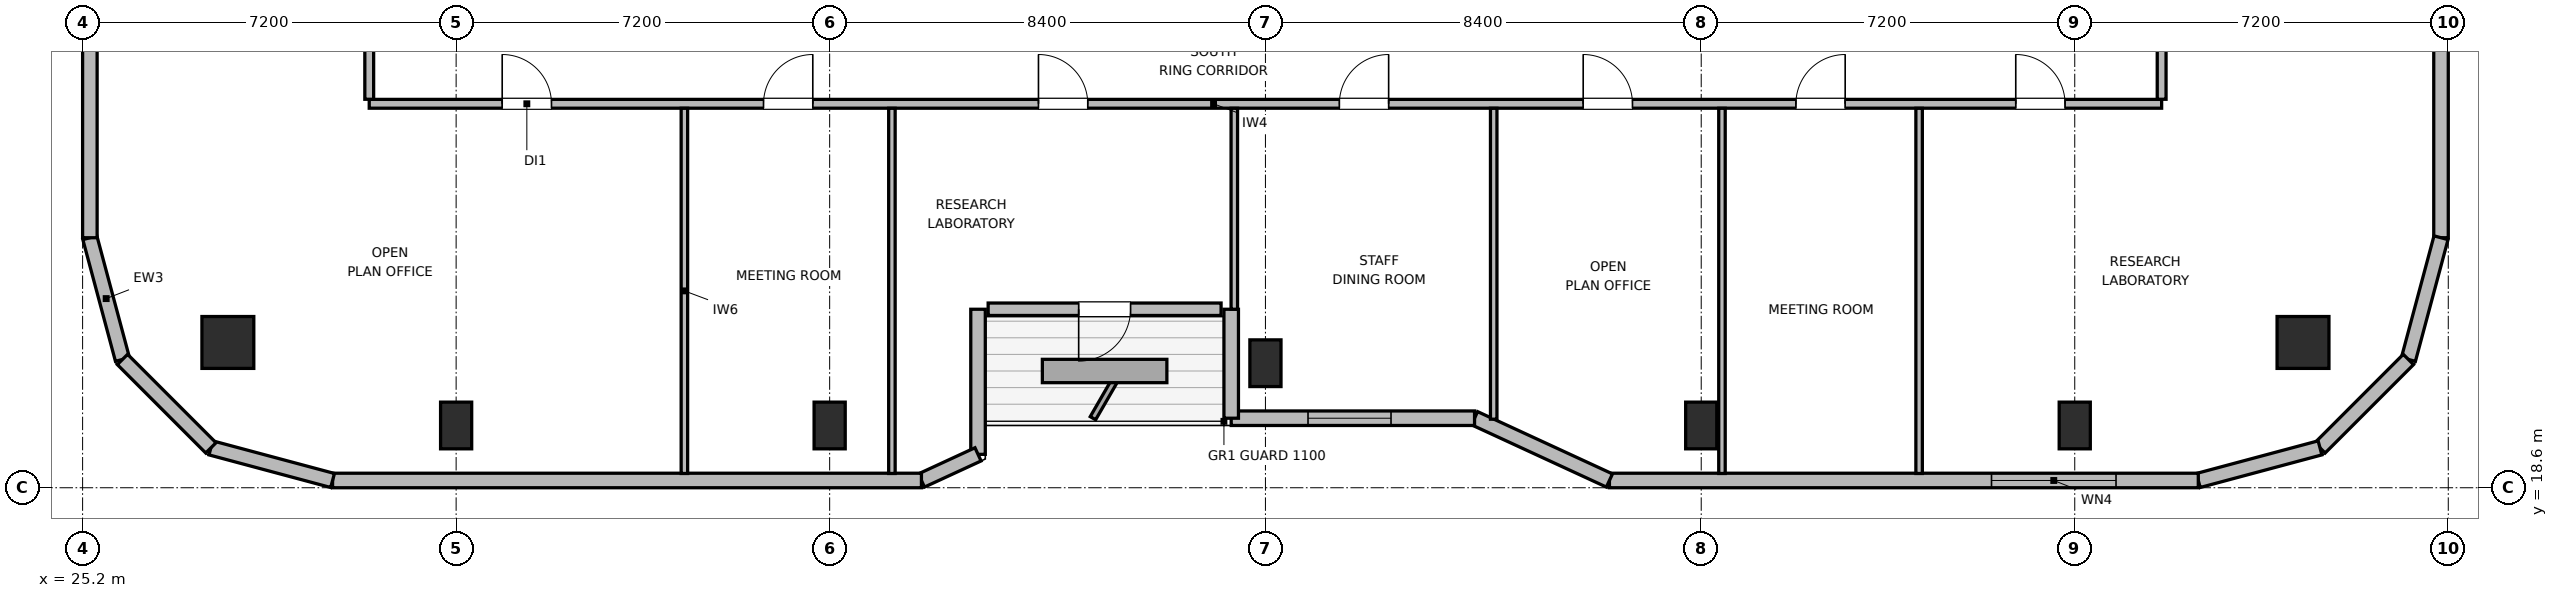
"""IFC4 building model, lengths in metres.
Left out: names, types, materials, properties, quantities, classifications, styles, units other than length and angle.
Written with IfcOpenShell. Run it as: python <this file> out.ifc"""

import sys

from ifc_helpers import new_model, si_unit, direction, frame, frame_2d, origin, origin_2d, place, context, subcontext, project, spatial, rectangle, circle, extrude, element, fill, save


model = new_model("IFC4")
c1 = context("Model", 3, precision=1e-05, world=origin(), true_north=direction((0.0, 1.0)))
c2 = subcontext(c1, "Body", "Model", "MODEL_VIEW")
j1 = project(units=[si_unit("LENGTHUNIT", "METRE"), si_unit("PLANEANGLEUNIT", "RADIAN")], contexts=[c1])
p1 = place(None, origin())
s1 = spatial("IfcSite", under=j1, at=p1, CompositionType="ELEMENT")
p2 = place(p1, origin())
s2 = spatial("IfcBuilding", under=s1, at=p2, CompositionType="ELEMENT")
p3 = place(p2, frame((0.0, 0.0, 314.1)))
s3 = spatial("IfcBuildingStorey", under=s2, at=p3, CompositionType="ELEMENT", Elevation=314.1)
for number, where, z_axis, x_axis in (
    (1, (28.0, 21.4, 0.0), (0.0, 0.0, 1.0), (1.0, 0.0, 0.0)),
    (2, (68.0, 21.4, 0.0), (0.0, 0.0, 1.0), (1.0, 0.0, 0.0)),
):
    element("IfcColumn", number, at=place(p3, frame(where, z_axis=z_axis, x_axis=x_axis)), inside=s3, PredefinedType="COLUMN", context=c2, shape_type="SweptSolid", body=[
        extrude(circle(Radius=0.5, at=origin_2d()), origin(), (0.0, 0.0, 1.0), 3.9),
    ])
for number, where, z_axis, x_axis in (
    (3, (32.4, 19.8, 0.0), (0.0, 0.0, 1.0), (1.0, 0.0, 0.0)),
    (4, (39.6, 19.8, 0.0), (0.0, 0.0, 1.0), (1.0, 0.0, 0.0)),
    (5, (48.0, 21.0, 0.0), (0.0, 0.0, 1.0), (1.0, 0.0, 0.0)),
    (6, (56.4, 19.8, 0.0), (0.0, 0.0, 1.0), (1.0, 0.0, 0.0)),
    (7, (63.6, 19.8, 0.0), (0.0, 0.0, 1.0), (1.0, 0.0, 0.0)),
):
    element("IfcColumn", number, at=place(p3, frame(where, z_axis=z_axis, x_axis=x_axis)), inside=s3, PredefinedType="COLUMN", context=c2, shape_type="SweptSolid", body=[
        extrude(rectangle(XDim=0.6, YDim=0.9, at=origin_2d()), origin(), (0.0, 0.0, 1.0), 3.9),
    ])
p4 = place(p3, frame((25.969, 21.073, 0.0), z_axis=(0.0, 0.0, 1.0), x_axis=(-0.258751159445, 0.965944013639, 0.0)))
e8 = element("IfcWall", 8, at=p4, inside=s3, PredefinedType="SOLIDWALL", context=c2, shape_type="SweptSolid", body=[
    extrude(rectangle(XDim=2.429, YDim=0.28, at=frame_2d((1.214, 0.0))), origin(), (0.0, 0.0, 1.0), 3.68),
])
p5 = place(p3, frame((25.34, 23.418, 0.0), z_axis=(0.0, 0.0, 1.0), x_axis=(0.0, 1.0, 0.0)))
e9 = element("IfcWall", 9, at=p5, inside=s3, PredefinedType="SOLIDWALL", context=c2, shape_type="SweptSolid", body=[
    extrude(rectangle(XDim=5.842, YDim=0.28, at=frame_2d((2.921, 0.0))), origin(), (0.0, 0.0, 1.0), 3.68),
])
p6 = place(p3, frame((70.66, 37.66, 0.0), z_axis=(0.0, 0.0, 1.0), x_axis=(0.0, -1.0, 0.0)))
e10 = element("IfcWall", 10, at=p6, inside=s3, PredefinedType="SOLIDWALL", context=c2, shape_type="SweptSolid", body=[
    extrude(rectangle(XDim=14.241, YDim=0.28, at=frame_2d((7.121, 0.0))), origin(), (0.0, 0.0, 1.0), 3.68),
])
p7 = place(p6, frame((7.556, 0.0, 0.85)))
e11 = element("IfcOpeningElement", 11, at=p7, cuts=e10, PredefinedType="OPENING", context=c2, shape_type="SweptSolid", body=[
    extrude(rectangle(XDim=1.6, YDim=1.0, at=frame_2d((0.8, 0.5))), frame((0.0, 0.15, 0.0), z_axis=(0.0, -1.0, 0.0), x_axis=(1.0, 0.0, 0.0)), (0.0, 0.0, 1.0), 0.3),
])
p8 = place(p3, frame((70.66, 23.418, 0.0), z_axis=(0.0, 0.0, 1.0), x_axis=(-0.258751159445, -0.965944013639, 0.0)))
e12 = element("IfcWall", 12, at=p8, inside=s3, PredefinedType="SOLIDWALL", context=c2, shape_type="SweptSolid", body=[
    extrude(rectangle(XDim=2.429, YDim=0.28, at=frame_2d((1.214, 0.0))), origin(), (0.0, 0.0, 1.0), 3.68),
])
p9 = place(p3, frame((70.031, 21.073, 0.0), z_axis=(0.0, 0.0, 1.0), x_axis=(-0.707106781187, -0.707106781187, 0.0)))
e13 = element("IfcWall", 13, at=p9, inside=s3, PredefinedType="SOLIDWALL", context=c2, shape_type="SweptSolid", body=[
    extrude(rectangle(XDim=2.41, YDim=0.28, at=frame_2d((1.205, 0.0))), origin(), (0.0, 0.0, 1.0), 3.68),
])
p10 = place(p3, frame((68.327, 19.368, 0.0), z_axis=(0.0, 0.0, 1.0), x_axis=(-0.965937282298, -0.25877628691, 0.0)))
e14 = element("IfcWall", 14, at=p10, inside=s3, PredefinedType="SOLIDWALL", context=c2, shape_type="SweptSolid", body=[
    extrude(rectangle(XDim=2.428, YDim=0.28, at=frame_2d((1.214, 0.0))), origin(), (0.0, 0.0, 1.0), 3.68),
])
p11 = place(p3, frame((65.982, 18.74, 0.0), z_axis=(0.0, 0.0, 1.0), x_axis=(-1.0, 0.0, 0.0)))
e15 = element("IfcWall", 15, at=p11, inside=s3, PredefinedType="SOLIDWALL", context=c2, shape_type="SweptSolid", body=[
    extrude(rectangle(XDim=11.351, YDim=0.28, at=frame_2d((5.676, 0.0))), origin(), (0.0, 0.0, 1.0), 3.68),
])
p12 = place(p11, frame((1.586, 0.0, 0.85)))
e16 = element("IfcOpeningElement", 16, at=p12, cuts=e15, PredefinedType="OPENING", context=c2, shape_type="SweptSolid", body=[
    extrude(rectangle(XDim=2.4, YDim=1.15, at=frame_2d((1.2, 0.575))), frame((0.0, 0.15, 0.0), z_axis=(0.0, -1.0, 0.0), x_axis=(1.0, 0.0, 0.0)), (0.0, 0.0, 1.0), 0.3),
])
p13 = place(p3, frame((54.631, 18.74, 0.0), z_axis=(0.0, 0.0, 1.0), x_axis=(-0.907956889006, 0.419063584324, 0.0)))
e17 = element("IfcWall", 17, at=p13, inside=s3, PredefinedType="SOLIDWALL", context=c2, shape_type="SweptSolid", body=[
    extrude(rectangle(XDim=2.864, YDim=0.28, at=frame_2d((1.432, 0.0))), origin(), (0.0, 0.0, 1.0), 2.265),
])
p14 = place(p3, frame((52.031, 19.94, 0.0), z_axis=(0.0, 0.0, 1.0), x_axis=(-1.0, 0.0, 0.0)))
e18 = element("IfcWall", 18, at=p14, inside=s3, PredefinedType="SOLIDWALL", context=c2, shape_type="SweptSolid", body=[
    extrude(rectangle(XDim=4.691, YDim=0.28, at=frame_2d((2.345, 0.0))), origin(), (0.0, 0.0, 1.0), 2.265),
])
p15 = place(p14, frame((1.61, 0.0, 0.85)))
e19 = element("IfcOpeningElement", 19, at=p15, cuts=e18, PredefinedType="OPENING", context=c2, shape_type="SweptSolid", body=[
    extrude(rectangle(XDim=1.6, YDim=1.0, at=frame_2d((0.8, 0.5))), frame((0.0, 0.15, 0.0), z_axis=(0.0, -1.0, 0.0), x_axis=(1.0, 0.0, 0.0)), (0.0, 0.0, 1.0), 0.3),
])
p16 = place(p3, frame((47.34, 19.94, 0.0), z_axis=(0.0, 0.0, 1.0), x_axis=(0.0, 1.0, 0.0)))
e20 = element("IfcWall", 20, at=p16, inside=s3, PredefinedType="SOLIDWALL", context=c2, shape_type="SweptSolid", body=[
    extrude(rectangle(XDim=2.1, YDim=0.28, at=frame_2d((1.05, 0.0))), origin(), (0.0, 0.0, 1.0), 2.265),
])
p17 = place(p3, frame((47.145, 22.04, 0.0), z_axis=(0.0, 0.0, 1.0), x_axis=(-1.0, 0.0, 0.0)))
e21 = element("IfcWall", 21, at=p17, inside=s3, PredefinedType="SOLIDWALL", context=c2, shape_type="SweptSolid", body=[
    extrude(rectangle(XDim=4.49, YDim=0.24, at=frame_2d((2.245, 0.0))), origin(), (0.0, 0.0, 1.0), 3.68),
])
p18 = place(p17, frame((1.745, 0.0, 0.0)))
e22 = element("IfcOpeningElement", 22, at=p18, cuts=e21, PredefinedType="OPENING", context=c2, shape_type="SweptSolid", body=[
    extrude(rectangle(XDim=1.0, YDim=2.02, at=frame_2d((0.5, 1.01))), frame((0.0, 0.13, 0.0), z_axis=(0.0, -1.0, 0.0), x_axis=(1.0, 0.0, 0.0)), (0.0, 0.0, 1.0), 0.26),
])
p19 = place(p3, frame((42.46, 22.04, 0.0), z_axis=(0.0, 0.0, 1.0), x_axis=(0.0, -1.0, 0.0)))
e23 = element("IfcWall", 23, at=p19, inside=s3, PredefinedType="SOLIDWALL", context=c2, shape_type="SweptSolid", body=[
    extrude(rectangle(XDim=2.796, YDim=0.28, at=frame_2d((1.398, 0.0))), origin(), (0.0, 0.0, 1.0), 2.265),
])
p20 = place(p3, frame((42.46, 19.244, 0.0), z_axis=(0.0, 0.0, 1.0), x_axis=(-0.907893953211, -0.419199916176, 0.0)))
e24 = element("IfcWall", 24, at=p20, inside=s3, PredefinedType="SOLIDWALL", context=c2, shape_type="SweptSolid", body=[
    extrude(rectangle(XDim=1.201, YDim=0.28, at=frame_2d((0.601, 0.0))), origin(), (0.0, 0.0, 1.0), 3.68),
])
p21 = place(p3, frame((41.369, 18.74, 0.0), z_axis=(0.0, 0.0, 1.0), x_axis=(-1.0, 0.0, 0.0)))
e25 = element("IfcWall", 25, at=p21, inside=s3, PredefinedType="SOLIDWALL", context=c2, shape_type="SweptSolid", body=[
    extrude(rectangle(XDim=11.351, YDim=0.28, at=frame_2d((5.675, 0.0))), origin(), (0.0, 0.0, 1.0), 3.68),
])
p22 = place(p3, frame((30.018, 18.74, 0.0), z_axis=(0.0, 0.0, 1.0), x_axis=(-0.965937282298, 0.25877628691, 0.0)))
e26 = element("IfcWall", 26, at=p22, inside=s3, PredefinedType="SOLIDWALL", context=c2, shape_type="SweptSolid", body=[
    extrude(rectangle(XDim=2.428, YDim=0.28, at=frame_2d((1.214, 0.0))), origin(), (0.0, 0.0, 1.0), 3.68),
])
p23 = place(p3, frame((27.673, 19.368, 0.0), z_axis=(0.0, 0.0, 1.0), x_axis=(-0.707106781187, 0.707106781187, 0.0)))
e27 = element("IfcWall", 27, at=p23, inside=s3, PredefinedType="SOLIDWALL", context=c2, shape_type="SweptSolid", body=[
    extrude(rectangle(XDim=2.41, YDim=0.28, at=frame_2d((1.205, 0.0))), origin(), (0.0, 0.0, 1.0), 3.68),
])
p24 = place(p3, frame((30.725, 26.0, 0.0), z_axis=(0.0, 0.0, 1.0), x_axis=(1.0, 0.0, 0.0)))
e28 = element("IfcWall", 28, at=p24, inside=s3, PredefinedType="PARTITIONING", context=c2, shape_type="SweptSolid", body=[
    extrude(rectangle(XDim=34.55, YDim=0.17, at=frame_2d((17.275, 0.0))), origin(), (0.0, 0.0, 1.0), 3.68),
])
p25 = place(p24, frame((2.563, 0.0, 0.0)))
e29 = element("IfcOpeningElement", 29, at=p25, cuts=e28, PredefinedType="OPENING", context=c2, shape_type="SweptSolid", body=[
    extrude(rectangle(XDim=0.95, YDim=2.04, at=frame_2d((0.475, 1.02))), frame((0.0, 0.095, 0.0), z_axis=(0.0, -1.0, 0.0), x_axis=(1.0, 0.0, 0.0)), (0.0, 0.0, 1.0), 0.19),
])
p26 = place(p24, frame((7.6, 0.0, 0.0)))
e30 = element("IfcOpeningElement", 30, at=p26, cuts=e28, PredefinedType="OPENING", context=c2, shape_type="SweptSolid", body=[
    extrude(rectangle(XDim=0.95, YDim=2.04, at=frame_2d((0.475, 1.02))), frame((0.0, 0.095, 0.0), z_axis=(0.0, -1.0, 0.0), x_axis=(1.0, 0.0, 0.0)), (0.0, 0.0, 1.0), 0.19),
])
p27 = place(p24, frame((12.9, 0.0, 0.0)))
e31 = element("IfcOpeningElement", 31, at=p27, cuts=e28, PredefinedType="OPENING", context=c2, shape_type="SweptSolid", body=[
    extrude(rectangle(XDim=0.95, YDim=2.04, at=frame_2d((0.475, 1.02))), frame((0.0, 0.095, 0.0), z_axis=(0.0, -1.0, 0.0), x_axis=(1.0, 0.0, 0.0)), (0.0, 0.0, 1.0), 0.19),
])
p28 = place(p24, frame((18.7, 0.0, 0.0)))
e32 = element("IfcOpeningElement", 32, at=p28, cuts=e28, PredefinedType="OPENING", context=c2, shape_type="SweptSolid", body=[
    extrude(rectangle(XDim=0.95, YDim=2.04, at=frame_2d((0.475, 1.02))), frame((0.0, 0.095, 0.0), z_axis=(0.0, -1.0, 0.0), x_axis=(1.0, 0.0, 0.0)), (0.0, 0.0, 1.0), 0.19),
])
p29 = place(p24, frame((23.4, 0.0, 0.0)))
e33 = element("IfcOpeningElement", 33, at=p29, cuts=e28, PredefinedType="OPENING", context=c2, shape_type="SweptSolid", body=[
    extrude(rectangle(XDim=0.95, YDim=2.04, at=frame_2d((0.475, 1.02))), frame((0.0, 0.095, 0.0), z_axis=(0.0, -1.0, 0.0), x_axis=(1.0, 0.0, 0.0)), (0.0, 0.0, 1.0), 0.19),
])
p30 = place(p24, frame((27.5, 0.0, 0.0)))
e34 = element("IfcOpeningElement", 34, at=p30, cuts=e28, PredefinedType="OPENING", context=c2, shape_type="SweptSolid", body=[
    extrude(rectangle(XDim=0.95, YDim=2.04, at=frame_2d((0.475, 1.02))), frame((0.0, 0.095, 0.0), z_axis=(0.0, -1.0, 0.0), x_axis=(1.0, 0.0, 0.0)), (0.0, 0.0, 1.0), 0.19),
])
p31 = place(p24, frame((31.738, 0.0, 0.0)))
e35 = element("IfcOpeningElement", 35, at=p31, cuts=e28, PredefinedType="OPENING", context=c2, shape_type="SweptSolid", body=[
    extrude(rectangle(XDim=0.95, YDim=2.04, at=frame_2d((0.475, 1.02))), frame((0.0, 0.095, 0.0), z_axis=(0.0, -1.0, 0.0), x_axis=(1.0, 0.0, 0.0)), (0.0, 0.0, 1.0), 0.19),
])
p32 = place(p3, frame((30.725, 26.087, 0.0), z_axis=(0.0, 0.0, 1.0), x_axis=(0.0, 1.0, 0.0)))
e36 = element("IfcWall", 36, at=p32, inside=s3, PredefinedType="PARTITIONING", context=c2, shape_type="SweptSolid", body=[
    extrude(rectangle(XDim=19.826, YDim=0.17, at=frame_2d((9.913, 0.0))), origin(), (0.0, 0.0, 1.0), 3.68),
])
p33 = place(p32, frame((9.438, 0.0, 0.0)))
e37 = element("IfcOpeningElement", 37, at=p33, cuts=e36, PredefinedType="OPENING", context=c2, shape_type="SweptSolid", body=[
    extrude(rectangle(XDim=0.95, YDim=2.04, at=frame_2d((0.475, 1.02))), frame((0.0, 0.095, 0.0), z_axis=(0.0, -1.0, 0.0), x_axis=(1.0, 0.0, 0.0)), (0.0, 0.0, 1.0), 0.19),
])
p34 = place(p3, frame((65.275, 26.087, 0.0), z_axis=(0.0, 0.0, 1.0), x_axis=(0.0, 1.0, 0.0)))
e38 = element("IfcWall", 38, at=p34, inside=s3, PredefinedType="PARTITIONING", context=c2, shape_type="SweptSolid", body=[
    extrude(rectangle(XDim=19.826, YDim=0.17, at=frame_2d((9.913, 0.0))), origin(), (0.0, 0.0, 1.0), 3.68),
])
p35 = place(p34, frame((3.938, 0.0, 0.0)))
e39 = element("IfcOpeningElement", 39, at=p35, cuts=e38, PredefinedType="OPENING", context=c2, shape_type="SweptSolid", body=[
    extrude(rectangle(XDim=0.95, YDim=2.04, at=frame_2d((0.475, 1.02))), frame((0.0, 0.095, 0.0), z_axis=(0.0, -1.0, 0.0), x_axis=(1.0, 0.0, 0.0)), (0.0, 0.0, 1.0), 0.19),
])
p36 = place(p34, frame((13.938, 0.0, 0.0)))
e40 = element("IfcOpeningElement", 40, at=p36, cuts=e38, PredefinedType="OPENING", context=c2, shape_type="SweptSolid", body=[
    extrude(rectangle(XDim=0.95, YDim=2.04, at=frame_2d((0.475, 1.02))), frame((0.0, 0.095, 0.0), z_axis=(0.0, -1.0, 0.0), x_axis=(1.0, 0.0, 0.0)), (0.0, 0.0, 1.0), 0.19),
])
p37 = place(p3, frame((36.8, 18.875, 0.0), z_axis=(0.0, 0.0, 1.0), x_axis=(0.0, 1.0, 0.0)))
e41 = element("IfcWall", 41, at=p37, inside=s3, PredefinedType="PARTITIONING", context=c2, shape_type="SweptSolid", body=[
    extrude(rectangle(XDim=7.038, YDim=0.125, at=frame_2d((3.519, 0.0))), origin(), (0.0, 0.0, 1.0), 3.68),
])
p38 = place(p3, frame((40.8, 18.875, 0.0), z_axis=(0.0, 0.0, 1.0), x_axis=(0.0, 1.0, 0.0)))
e42 = element("IfcWall", 42, at=p38, inside=s3, PredefinedType="PARTITIONING", context=c2, shape_type="SweptSolid", body=[
    extrude(rectangle(XDim=7.038, YDim=0.125, at=frame_2d((3.519, 0.0))), origin(), (0.0, 0.0, 1.0), 3.043),
])
p39 = place(p3, frame((47.4, 22.04, 0.0), z_axis=(0.0, 0.0, 1.0), x_axis=(0.0, 1.0, 0.0)))
e43 = element("IfcWall", 43, at=p39, inside=s3, PredefinedType="PARTITIONING", context=c2, shape_type="SweptSolid", body=[
    extrude(rectangle(XDim=3.873, YDim=0.125, at=frame_2d((1.937, 0.0))), origin(), (0.0, 0.0, 1.0), 3.68),
])
p40 = place(p3, frame((52.4, 19.921, 0.0), z_axis=(0.0, 0.0, 1.0), x_axis=(0.0, 1.0, 0.0)))
e44 = element("IfcWall", 44, at=p40, inside=s3, PredefinedType="PARTITIONING", context=c2, shape_type="SweptSolid", body=[
    extrude(rectangle(XDim=5.992, YDim=0.125, at=frame_2d((2.996, 0.0))), origin(), (0.0, 0.0, 1.0), 3.043),
])
for number, where, z_axis, x_axis in (
    (45, (56.8, 18.875, 0.0), (0.0, 0.0, 1.0), (0.0, 1.0, 0.0)),
    (46, (60.6, 18.875, 0.0), (0.0, 0.0, 1.0), (0.0, 1.0, 0.0)),
):
    element("IfcWall", number, at=place(p3, frame(where, z_axis=z_axis, x_axis=x_axis)), inside=s3, PredefinedType="PARTITIONING", context=c2, shape_type="SweptSolid", body=[
        extrude(rectangle(XDim=7.038, YDim=0.125, at=frame_2d((3.519, 0.0))), origin(), (0.0, 0.0, 1.0), 3.68),
    ])
p41 = place(p12, origin())
e47 = element("IfcWindow", 47, at=p41, inside=s3, PartitioningType="SINGLE_PANEL", PredefinedType="WINDOW", context=c2, shape_type="SweptSolid", body=[
    extrude(rectangle(XDim=2.4, YDim=1.15, at=frame_2d((1.2, 0.575))), frame((0.0, 0.03, 0.0), z_axis=(0.0, -1.0, 0.0), x_axis=(1.0, 0.0, 0.0)), (0.0, 0.0, 1.0), 0.06),
])
fill(e16, e47)
p42 = place(p15, origin())
e48 = element("IfcWindow", 48, at=p42, inside=s3, PartitioningType="SINGLE_PANEL", PredefinedType="WINDOW", context=c2, shape_type="SweptSolid", body=[
    extrude(rectangle(XDim=1.6, YDim=1.0, at=frame_2d((0.8, 0.5))), frame((0.0, 0.03, 0.0), z_axis=(0.0, -1.0, 0.0), x_axis=(1.0, 0.0, 0.0)), (0.0, 0.0, 1.0), 0.06),
])
fill(e19, e48)
p43 = place(p18, origin())
e49 = element("IfcDoor", 49, at=p43, inside=s3, OperationType="SINGLE_SWING_RIGHT", PredefinedType="DOOR", context=c2, shape_type="SweptSolid", body=[
    extrude(rectangle(XDim=1.0, YDim=2.02, at=frame_2d((0.5, 1.01))), frame((0.0, 0.025, 0.0), z_axis=(0.0, -1.0, 0.0), x_axis=(1.0, 0.0, 0.0)), (0.0, 0.0, 1.0), 0.05),
])
fill(e22, e49)
p44 = place(p25, origin())
e50 = element("IfcDoor", 50, at=p44, inside=s3, OperationType="SINGLE_SWING_LEFT", PredefinedType="DOOR", context=c2, shape_type="SweptSolid", body=[
    extrude(rectangle(XDim=0.95, YDim=2.04, at=frame_2d((0.475, 1.02))), frame((0.0, 0.025, 0.0), z_axis=(0.0, -1.0, 0.0), x_axis=(1.0, 0.0, 0.0)), (0.0, 0.0, 1.0), 0.05),
])
fill(e29, e50)
p45 = place(p26, origin())
e51 = element("IfcDoor", 51, at=p45, inside=s3, OperationType="SINGLE_SWING_RIGHT", PredefinedType="DOOR", context=c2, shape_type="SweptSolid", body=[
    extrude(rectangle(XDim=0.95, YDim=2.04, at=frame_2d((0.475, 1.02))), frame((0.0, 0.025, 0.0), z_axis=(0.0, -1.0, 0.0), x_axis=(1.0, 0.0, 0.0)), (0.0, 0.0, 1.0), 0.05),
])
fill(e30, e51)
p46 = place(p27, origin())
e52 = element("IfcDoor", 52, at=p46, inside=s3, OperationType="SINGLE_SWING_LEFT", PredefinedType="DOOR", context=c2, shape_type="SweptSolid", body=[
    extrude(rectangle(XDim=0.95, YDim=2.04, at=frame_2d((0.475, 1.02))), frame((0.0, 0.025, 0.0), z_axis=(0.0, -1.0, 0.0), x_axis=(1.0, 0.0, 0.0)), (0.0, 0.0, 1.0), 0.05),
])
fill(e31, e52)
p47 = place(p28, origin())
e53 = element("IfcDoor", 53, at=p47, inside=s3, OperationType="SINGLE_SWING_RIGHT", PredefinedType="DOOR", context=c2, shape_type="SweptSolid", body=[
    extrude(rectangle(XDim=0.95, YDim=2.04, at=frame_2d((0.475, 1.02))), frame((0.0, 0.025, 0.0), z_axis=(0.0, -1.0, 0.0), x_axis=(1.0, 0.0, 0.0)), (0.0, 0.0, 1.0), 0.05),
])
fill(e32, e53)
p48 = place(p29, origin())
e54 = element("IfcDoor", 54, at=p48, inside=s3, OperationType="SINGLE_SWING_LEFT", PredefinedType="DOOR", context=c2, shape_type="SweptSolid", body=[
    extrude(rectangle(XDim=0.95, YDim=2.04, at=frame_2d((0.475, 1.02))), frame((0.0, 0.025, 0.0), z_axis=(0.0, -1.0, 0.0), x_axis=(1.0, 0.0, 0.0)), (0.0, 0.0, 1.0), 0.05),
])
fill(e33, e54)
p49 = place(p30, origin())
e55 = element("IfcDoor", 55, at=p49, inside=s3, OperationType="SINGLE_SWING_RIGHT", PredefinedType="DOOR", context=c2, shape_type="SweptSolid", body=[
    extrude(rectangle(XDim=0.95, YDim=2.04, at=frame_2d((0.475, 1.02))), frame((0.0, 0.025, 0.0), z_axis=(0.0, -1.0, 0.0), x_axis=(1.0, 0.0, 0.0)), (0.0, 0.0, 1.0), 0.05),
])
fill(e34, e55)
p50 = place(p31, origin())
e56 = element("IfcDoor", 56, at=p50, inside=s3, OperationType="SINGLE_SWING_LEFT", PredefinedType="DOOR", context=c2, shape_type="SweptSolid", body=[
    extrude(rectangle(XDim=0.95, YDim=2.04, at=frame_2d((0.475, 1.02))), frame((0.0, 0.025, 0.0), z_axis=(0.0, -1.0, 0.0), x_axis=(1.0, 0.0, 0.0)), (0.0, 0.0, 1.0), 0.05),
])
fill(e35, e56)
save(model, sys.argv[1])
